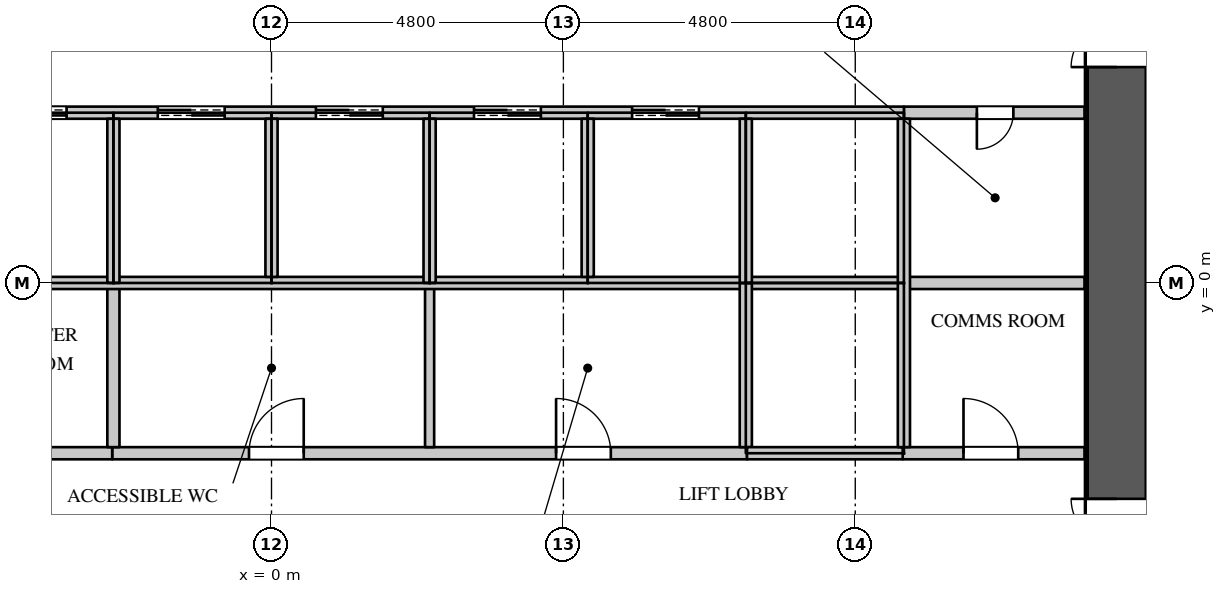
"""IFC4 building model, lengths in metres.
Left out: names, types, materials, properties, quantities, classifications, styles, units other than length and angle.
Written with IfcOpenShell. Run it as: python <this file> out.ifc"""

import sys

from ifc_helpers import new_model, si_unit, direction, frame, frame_2d, origin, place, context, subcontext, project, spatial, rectangle, extrude, element, fill, save


model = new_model("IFC4")
c1 = context("Model", 3, precision=1e-05, world=origin(), true_north=direction((0.0, 1.0)))
c2 = subcontext(c1, "Body", "Model", "MODEL_VIEW")
j1 = project(units=[si_unit("LENGTHUNIT", "METRE"), si_unit("PLANEANGLEUNIT", "RADIAN")], contexts=[c1])
p1 = place(None, origin())
s1 = spatial("IfcSite", under=j1, at=p1, CompositionType="ELEMENT")
p2 = place(p1, origin())
s2 = spatial("IfcBuilding", under=s1, at=p2, CompositionType="ELEMENT")
p3 = place(p2, frame((0.0, 0.0, 92.7)))
s3 = spatial("IfcBuildingStorey", under=s2, at=p3, CompositionType="ELEMENT", Elevation=92.7)
p4 = place(p3, frame((13.9, -11.0, 0.0), z_axis=(0.0, 0.0, 1.0), x_axis=(0.0, 1.0, 0.0)))
e1 = element("IfcWall", 1, at=p4, inside=s3, PredefinedType="SHEAR", context=c2, shape_type="SweptSolid", body=[
    extrude(rectangle(XDim=22.0, YDim=1.0, at=frame_2d((11.0, 0.0))), origin(), (0.0, 0.0, 1.0), 4.2),
])
p5 = place(p4, frame((20.05, 0.0, 0.0)))
e2 = element("IfcOpeningElement", 2, at=p5, cuts=e1, PredefinedType="OPENING", context=c2, shape_type="SweptSolid", body=[
    extrude(rectangle(XDim=1.1, YDim=2.2, at=frame_2d((0.55, 1.1))), frame((0.0, 0.51, 0.0), z_axis=(0.0, -1.0, 0.0), x_axis=(1.0, 0.0, 0.0)), (0.0, 0.0, 1.0), 1.02),
])
p6 = place(p4, frame((0.85, 0.0, 0.0)))
e3 = element("IfcOpeningElement", 3, at=p6, cuts=e1, PredefinedType="OPENING", context=c2, shape_type="SweptSolid", body=[
    extrude(rectangle(XDim=1.1, YDim=2.2, at=frame_2d((0.55, 1.1))), frame((0.0, 0.51, 0.0), z_axis=(0.0, -1.0, 0.0), x_axis=(1.0, 0.0, 0.0)), (0.0, 0.0, 1.0), 1.02),
])
p7 = place(p4, frame((14.55, 0.0, 0.0)))
e4 = element("IfcOpeningElement", 4, at=p7, cuts=e1, PredefinedType="OPENING", context=c2, shape_type="SweptSolid", body=[
    extrude(rectangle(XDim=1.5, YDim=2.4, at=frame_2d((0.75, 1.2))), frame((0.0, 0.51, 0.0), z_axis=(0.0, -1.0, 0.0), x_axis=(1.0, 0.0, 0.0)), (0.0, 0.0, 1.0), 1.02),
])
p8 = place(p4, frame((5.95, 0.0, 0.0)))
e5 = element("IfcOpeningElement", 5, at=p8, cuts=e1, PredefinedType="OPENING", context=c2, shape_type="SweptSolid", body=[
    extrude(rectangle(XDim=1.5, YDim=2.4, at=frame_2d((0.75, 1.2))), frame((0.0, 0.51, 0.0), z_axis=(0.0, -1.0, 0.0), x_axis=(1.0, 0.0, 0.0)), (0.0, 0.0, 1.0), 1.02),
])
p9 = place(p3, frame((-2.62, -2.8, 0.0), z_axis=(0.0, 0.0, 1.0), x_axis=(1.0, 0.0, 0.0)))
e6 = element("IfcWall", 6, at=p9, inside=s3, PredefinedType="PARTITIONING", context=c2, shape_type="SweptSolid", body=[
    extrude(rectangle(XDim=10.44, YDim=0.2, at=frame_2d((5.22, 0.0))), origin(), (0.0, 0.0, 1.0), 3.798),
])
p10 = place(p9, frame((2.25, 0.0, 0.0)))
e7 = element("IfcOpeningElement", 7, at=p10, cuts=e6, PredefinedType="OPENING", context=c2, shape_type="SweptSolid", body=[
    extrude(rectangle(XDim=0.9, YDim=2.2, at=frame_2d((0.45, 1.1))), frame((0.0, 0.11, 0.0), z_axis=(0.0, -1.0, 0.0), x_axis=(1.0, 0.0, 0.0)), (0.0, 0.0, 1.0), 0.22),
])
p11 = place(p9, frame((7.3, 0.0, 0.0)))
e8 = element("IfcOpeningElement", 8, at=p11, cuts=e6, PredefinedType="OPENING", context=c2, shape_type="SweptSolid", body=[
    extrude(rectangle(XDim=0.9, YDim=2.2, at=frame_2d((0.45, 1.1))), frame((0.0, 0.11, 0.0), z_axis=(0.0, -1.0, 0.0), x_axis=(1.0, 0.0, 0.0)), (0.0, 0.0, 1.0), 0.22),
])
p12 = place(p3, frame((2.6, -2.7, 0.0), z_axis=(0.0, 0.0, 1.0), x_axis=(0.0, 1.0, 0.0)))
e9 = element("IfcWall", 9, at=p12, inside=s3, PredefinedType="PARTITIONING", context=c2, shape_type="SweptSolid", body=[
    extrude(rectangle(XDim=2.7, YDim=0.15, at=frame_2d((1.35, 0.0))), origin(), (0.0, 0.0, 1.0), 3.798),
])
p13 = place(p3, frame((-7.82, -2.8, 0.0), z_axis=(0.0, 0.0, 1.0), x_axis=(1.0, 0.0, 0.0)))
e10 = element("IfcWall", 10, at=p13, inside=s3, PredefinedType="PARTITIONING", context=c2, shape_type="SweptSolid", body=[
    extrude(rectangle(XDim=5.2, YDim=0.2, at=frame_2d((2.6, 0.0))), origin(), (0.0, 0.0, 1.0), 3.798),
])
p14 = place(p13, frame((2.15, 0.0, 0.0)))
e11 = element("IfcOpeningElement", 11, at=p14, cuts=e10, PredefinedType="OPENING", context=c2, shape_type="SweptSolid", body=[
    extrude(rectangle(XDim=0.9, YDim=2.2, at=frame_2d((0.45, 1.1))), frame((0.0, 0.11, 0.0), z_axis=(0.0, -1.0, 0.0), x_axis=(1.0, 0.0, 0.0)), (0.0, 0.0, 1.0), 0.22),
])
p15 = place(p3, frame((-2.6, -2.7, 0.0), z_axis=(0.0, 0.0, 1.0), x_axis=(0.0, 1.0, 0.0)))
e12 = element("IfcWall", 12, at=p15, inside=s3, PredefinedType="PARTITIONING", context=c2, shape_type="SweptSolid", body=[
    extrude(rectangle(XDim=2.7, YDim=0.2, at=frame_2d((1.35, 0.0))), origin(), (0.0, 0.0, 1.0), 3.798),
])
p16 = place(p3, frame((10.38, -2.8, 0.0), z_axis=(0.0, 0.0, 1.0), x_axis=(1.0, 0.0, 0.0)))
e13 = element("IfcWall", 13, at=p16, inside=s3, PredefinedType="PARTITIONING", context=c2, shape_type="SweptSolid", body=[
    extrude(rectangle(XDim=2.99, YDim=0.2, at=frame_2d((1.495, 0.0))), origin(), (0.0, 0.0, 1.0), 3.798),
])
p17 = place(p16, frame((1.0, 0.0, 0.0)))
e14 = element("IfcOpeningElement", 14, at=p17, cuts=e13, PredefinedType="OPENING", context=c2, shape_type="SweptSolid", body=[
    extrude(rectangle(XDim=0.9, YDim=2.2, at=frame_2d((0.45, 1.1))), frame((0.0, 0.11, 0.0), z_axis=(0.0, -1.0, 0.0), x_axis=(1.0, 0.0, 0.0)), (0.0, 0.0, 1.0), 0.22),
])
p18 = place(p3, frame((10.4, 2.8, 0.0), z_axis=(0.0, 0.0, 1.0), x_axis=(1.0, 0.0, 0.0)))
e15 = element("IfcWall", 15, at=p18, inside=s3, PredefinedType="PARTITIONING", context=c2, shape_type="SweptSolid", body=[
    extrude(rectangle(XDim=2.97, YDim=0.2, at=frame_2d((1.485, 0.0))), origin(), (0.0, 0.0, 1.0), 3.798),
])
p19 = place(p18, frame((1.2, 0.0, 0.0)))
e16 = element("IfcOpeningElement", 16, at=p19, cuts=e15, PredefinedType="OPENING", context=c2, shape_type="SweptSolid", body=[
    extrude(rectangle(XDim=0.6, YDim=2.0, at=frame_2d((0.3, 1.0))), frame((0.0, 0.11, 0.0), z_axis=(0.0, -1.0, 0.0), x_axis=(1.0, 0.0, 0.0)), (0.0, 0.0, 1.0), 0.22),
])
p20 = place(p3, frame((10.4, 0.0, 0.0), z_axis=(0.0, 0.0, 1.0), x_axis=(1.0, 0.0, 0.0)))
e17 = element("IfcWall", 17, at=p20, inside=s3, PredefinedType="PARTITIONING", context=c2, shape_type="SweptSolid", body=[
    extrude(rectangle(XDim=2.97, YDim=0.2, at=frame_2d((1.485, 0.0))), origin(), (0.0, 0.0, 1.0), 3.798),
])
p21 = place(p3, frame((-13.37, 0.0, 0.0), z_axis=(0.0, 0.0, 1.0), x_axis=(1.0, 0.0, 0.0)))
e18 = element("IfcWall", 18, at=p21, inside=s3, PredefinedType="PARTITIONING", context=c2, shape_type="SweptSolid", body=[
    extrude(rectangle(XDim=23.77, YDim=0.2, at=frame_2d((11.885, 0.0))), origin(), (0.0, 0.0, 1.0), 3.798),
])
p22 = place(p3, frame((-13.37, 2.8, 0.0), z_axis=(0.0, 0.0, 1.0), x_axis=(1.0, 0.0, 0.0)))
e19 = element("IfcWall", 19, at=p22, inside=s3, PredefinedType="PARTITIONING", context=c2, shape_type="SweptSolid", body=[
    extrude(rectangle(XDim=23.77, YDim=0.2, at=frame_2d((11.885, 0.0))), origin(), (0.0, 0.0, 1.0), 3.798),
])
p23 = place(p22, frame((0.9, 0.0, 0.0)))
e20 = element("IfcOpeningElement", 20, at=p23, cuts=e19, PredefinedType="OPENING", context=c2, shape_type="SweptSolid", body=[
    extrude(rectangle(XDim=1.1, YDim=2.2, at=frame_2d((0.55, 1.1))), frame((0.0, 0.11, 0.0), z_axis=(0.0, -1.0, 0.0), x_axis=(1.0, 0.0, 0.0)), (0.0, 0.0, 1.0), 0.22),
])
p24 = place(p22, frame((3.7, 0.0, 0.0)))
e21 = element("IfcOpeningElement", 21, at=p24, cuts=e19, PredefinedType="OPENING", context=c2, shape_type="SweptSolid", body=[
    extrude(rectangle(XDim=1.1, YDim=2.2, at=frame_2d((0.55, 1.1))), frame((0.0, 0.11, 0.0), z_axis=(0.0, -1.0, 0.0), x_axis=(1.0, 0.0, 0.0)), (0.0, 0.0, 1.0), 0.22),
])
p25 = place(p22, frame((6.3, 0.0, 0.0)))
e22 = element("IfcOpeningElement", 22, at=p25, cuts=e19, PredefinedType="OPENING", context=c2, shape_type="SweptSolid", body=[
    extrude(rectangle(XDim=1.1, YDim=2.2, at=frame_2d((0.55, 1.1))), frame((0.0, 0.11, 0.0), z_axis=(0.0, -1.0, 0.0), x_axis=(1.0, 0.0, 0.0)), (0.0, 0.0, 1.0), 0.22),
])
p26 = place(p22, frame((8.9, 0.0, 0.0)))
e23 = element("IfcOpeningElement", 23, at=p26, cuts=e19, PredefinedType="OPENING", context=c2, shape_type="SweptSolid", body=[
    extrude(rectangle(XDim=1.1, YDim=2.2, at=frame_2d((0.55, 1.1))), frame((0.0, 0.11, 0.0), z_axis=(0.0, -1.0, 0.0), x_axis=(1.0, 0.0, 0.0)), (0.0, 0.0, 1.0), 0.22),
])
p27 = place(p22, frame((11.5, 0.0, 0.0)))
e24 = element("IfcOpeningElement", 24, at=p27, cuts=e19, PredefinedType="OPENING", context=c2, shape_type="SweptSolid", body=[
    extrude(rectangle(XDim=1.1, YDim=2.2, at=frame_2d((0.55, 1.1))), frame((0.0, 0.11, 0.0), z_axis=(0.0, -1.0, 0.0), x_axis=(1.0, 0.0, 0.0)), (0.0, 0.0, 1.0), 0.22),
])
p28 = place(p22, frame((14.1, 0.0, 0.0)))
e25 = element("IfcOpeningElement", 25, at=p28, cuts=e19, PredefinedType="OPENING", context=c2, shape_type="SweptSolid", body=[
    extrude(rectangle(XDim=1.1, YDim=2.2, at=frame_2d((0.55, 1.1))), frame((0.0, 0.11, 0.0), z_axis=(0.0, -1.0, 0.0), x_axis=(1.0, 0.0, 0.0)), (0.0, 0.0, 1.0), 0.22),
])
p29 = place(p22, frame((16.7, 0.0, 0.0)))
e26 = element("IfcOpeningElement", 26, at=p29, cuts=e19, PredefinedType="OPENING", context=c2, shape_type="SweptSolid", body=[
    extrude(rectangle(XDim=1.1, YDim=2.2, at=frame_2d((0.55, 1.1))), frame((0.0, 0.11, 0.0), z_axis=(0.0, -1.0, 0.0), x_axis=(1.0, 0.0, 0.0)), (0.0, 0.0, 1.0), 0.22),
])
p30 = place(p22, frame((19.3, 0.0, 0.0)))
e27 = element("IfcOpeningElement", 27, at=p30, cuts=e19, PredefinedType="OPENING", context=c2, shape_type="SweptSolid", body=[
    extrude(rectangle(XDim=1.1, YDim=2.2, at=frame_2d((0.55, 1.1))), frame((0.0, 0.11, 0.0), z_axis=(0.0, -1.0, 0.0), x_axis=(1.0, 0.0, 0.0)), (0.0, 0.0, 1.0), 0.22),
])
p31 = place(p3, frame((-2.6, 0.0, 0.0), z_axis=(0.0, 0.0, 1.0), x_axis=(0.0, 1.0, 0.0)))
e28 = element("IfcWall", 28, at=p31, inside=s3, PredefinedType="PARTITIONING", context=c2, shape_type="SweptSolid", body=[
    extrude(rectangle(XDim=2.7, YDim=0.2, at=frame_2d((1.35, 0.0))), origin(), (0.0, 0.0, 1.0), 3.798),
])
p32 = place(p3, frame((0.0, 0.1, 0.0), z_axis=(0.0, 0.0, 1.0), x_axis=(0.0, 1.0, 0.0)))
e29 = element("IfcWall", 29, at=p32, inside=s3, PredefinedType="PARTITIONING", context=c2, shape_type="SweptSolid", body=[
    extrude(rectangle(XDim=2.6, YDim=0.2, at=frame_2d((1.3, 0.0))), origin(), (0.0, 0.0, 1.0), 3.798),
])
p33 = place(p3, frame((2.6, 0.0, 0.0), z_axis=(0.0, 0.0, 1.0), x_axis=(0.0, 1.0, 0.0)))
e30 = element("IfcWall", 30, at=p33, inside=s3, PredefinedType="PARTITIONING", context=c2, shape_type="SweptSolid", body=[
    extrude(rectangle(XDim=2.7, YDim=0.2, at=frame_2d((1.35, 0.0))), origin(), (0.0, 0.0, 1.0), 3.798),
])
p34 = place(p3, frame((5.2, 0.1, 0.0), z_axis=(0.0, 0.0, 1.0), x_axis=(0.0, 1.0, 0.0)))
e31 = element("IfcWall", 31, at=p34, inside=s3, PredefinedType="PARTITIONING", context=c2, shape_type="SweptSolid", body=[
    extrude(rectangle(XDim=2.6, YDim=0.2, at=frame_2d((1.3, 0.0))), origin(), (0.0, 0.0, 1.0), 3.798),
])
p35 = place(p3, frame((7.8, -2.7, 0.0), z_axis=(0.0, 0.0, 1.0), x_axis=(0.0, 1.0, 0.0)))
e32 = element("IfcWall", 32, at=p35, inside=s3, PredefinedType="PARTITIONING", context=c2, shape_type="SweptSolid", body=[
    extrude(rectangle(XDim=2.7, YDim=0.2, at=frame_2d((1.35, 0.0))), origin(), (0.0, 0.0, 1.0), 3.798),
])
p36 = place(p3, frame((7.82, -2.8, 0.0), z_axis=(0.0, 0.0, 1.0), x_axis=(1.0, 0.0, 0.0)))
e33 = element("IfcWall", 33, at=p36, inside=s3, PredefinedType="PARTITIONING", context=c2, shape_type="SweptSolid", body=[
    extrude(rectangle(XDim=2.56, YDim=0.2, at=frame_2d((1.28, 0.0))), origin(), (0.0, 0.0, 1.0), 3.798),
])
p37 = place(p3, frame((7.8, 0.0, 0.0), z_axis=(0.0, 0.0, 1.0), x_axis=(0.0, 1.0, 0.0)))
e34 = element("IfcWall", 34, at=p37, inside=s3, PredefinedType="PARTITIONING", context=c2, shape_type="SweptSolid", body=[
    extrude(rectangle(XDim=2.7, YDim=0.2, at=frame_2d((1.35, 0.0))), origin(), (0.0, 0.0, 1.0), 3.798),
])
p38 = place(p3, frame((10.4, -2.7, 0.0), z_axis=(0.0, 0.0, 1.0), x_axis=(0.0, 1.0, 0.0)))
e35 = element("IfcWall", 35, at=p38, inside=s3, PredefinedType="PARTITIONING", context=c2, shape_type="SweptSolid", body=[
    extrude(rectangle(XDim=5.4, YDim=0.2, at=frame_2d((2.7, 0.0))), origin(), (0.0, 0.0, 1.0), 3.798),
])
p39 = place(p19, origin())
e36 = element("IfcDoor", 36, at=p39, inside=s3, OperationType="SINGLE_SWING_RIGHT", PredefinedType="DOOR", context=c2, shape_type="SweptSolid", body=[
    extrude(rectangle(XDim=0.6, YDim=2.0, at=frame_2d((0.3, 1.0))), frame((0.0, 0.025, 0.0), z_axis=(0.0, -1.0, 0.0), x_axis=(1.0, 0.0, 0.0)), (0.0, 0.0, 1.0), 0.05),
])
fill(e16, e36)
p40 = place(p17, origin())
e37 = element("IfcDoor", 37, at=p40, inside=s3, OperationType="SINGLE_SWING_LEFT", PredefinedType="DOOR", context=c2, shape_type="SweptSolid", body=[
    extrude(rectangle(XDim=0.9, YDim=2.2, at=frame_2d((0.45, 1.1))), frame((0.0, 0.025, 0.0), z_axis=(0.0, -1.0, 0.0), x_axis=(1.0, 0.0, 0.0)), (0.0, 0.0, 1.0), 0.05),
])
fill(e14, e37)
p41 = place(p10, origin())
e38 = element("IfcDoor", 38, at=p41, inside=s3, OperationType="SINGLE_SWING_RIGHT", PredefinedType="DOOR", context=c2, shape_type="SweptSolid", body=[
    extrude(rectangle(XDim=0.9, YDim=2.2, at=frame_2d((0.45, 1.1))), frame((0.0, 0.025, 0.0), z_axis=(0.0, -1.0, 0.0), x_axis=(1.0, 0.0, 0.0)), (0.0, 0.0, 1.0), 0.05),
])
fill(e7, e38)
p42 = place(p11, origin())
e39 = element("IfcDoor", 39, at=p42, inside=s3, OperationType="SINGLE_SWING_LEFT", PredefinedType="DOOR", context=c2, shape_type="SweptSolid", body=[
    extrude(rectangle(XDim=0.9, YDim=2.2, at=frame_2d((0.45, 1.1))), frame((0.0, 0.025, 0.0), z_axis=(0.0, -1.0, 0.0), x_axis=(1.0, 0.0, 0.0)), (0.0, 0.0, 1.0), 0.05),
])
fill(e8, e39)
p43 = place(p26, origin())
e40 = element("IfcDoor", 40, at=p43, inside=s3, OperationType="DOUBLE_DOOR_SLIDING", PredefinedType="DOOR", context=c2, shape_type="SweptSolid", body=[
    extrude(rectangle(XDim=1.1, YDim=2.2, at=frame_2d((0.55, 1.1))), frame((0.0, 0.025, 0.0), z_axis=(0.0, -1.0, 0.0), x_axis=(1.0, 0.0, 0.0)), (0.0, 0.0, 1.0), 0.05),
])
fill(e23, e40)
p44 = place(p27, origin())
e41 = element("IfcDoor", 41, at=p44, inside=s3, OperationType="DOUBLE_DOOR_SLIDING", PredefinedType="DOOR", context=c2, shape_type="SweptSolid", body=[
    extrude(rectangle(XDim=1.1, YDim=2.2, at=frame_2d((0.55, 1.1))), frame((0.0, 0.025, 0.0), z_axis=(0.0, -1.0, 0.0), x_axis=(1.0, 0.0, 0.0)), (0.0, 0.0, 1.0), 0.05),
])
fill(e24, e41)
p45 = place(p28, origin())
e42 = element("IfcDoor", 42, at=p45, inside=s3, OperationType="DOUBLE_DOOR_SLIDING", PredefinedType="DOOR", context=c2, shape_type="SweptSolid", body=[
    extrude(rectangle(XDim=1.1, YDim=2.2, at=frame_2d((0.55, 1.1))), frame((0.0, 0.025, 0.0), z_axis=(0.0, -1.0, 0.0), x_axis=(1.0, 0.0, 0.0)), (0.0, 0.0, 1.0), 0.05),
])
fill(e25, e42)
p46 = place(p29, origin())
e43 = element("IfcDoor", 43, at=p46, inside=s3, OperationType="DOUBLE_DOOR_SLIDING", PredefinedType="DOOR", context=c2, shape_type="SweptSolid", body=[
    extrude(rectangle(XDim=1.1, YDim=2.2, at=frame_2d((0.55, 1.1))), frame((0.0, 0.025, 0.0), z_axis=(0.0, -1.0, 0.0), x_axis=(1.0, 0.0, 0.0)), (0.0, 0.0, 1.0), 0.05),
])
fill(e26, e43)
p47 = place(p30, origin())
e44 = element("IfcDoor", 44, at=p47, inside=s3, OperationType="DOUBLE_DOOR_SLIDING", PredefinedType="DOOR", context=c2, shape_type="SweptSolid", body=[
    extrude(rectangle(XDim=1.1, YDim=2.2, at=frame_2d((0.55, 1.1))), frame((0.0, 0.025, 0.0), z_axis=(0.0, -1.0, 0.0), x_axis=(1.0, 0.0, 0.0)), (0.0, 0.0, 1.0), 0.05),
])
fill(e27, e44)
p48 = place(p7, origin())
e45 = element("IfcDoor", 45, at=p48, inside=s3, OperationType="DOUBLE_DOOR_SINGLE_SWING", PredefinedType="DOOR", context=c2, shape_type="SweptSolid", body=[
    extrude(rectangle(XDim=1.5, YDim=2.4, at=frame_2d((0.75, 1.2))), frame((0.0, 0.495, 0.0), z_axis=(0.0, -1.0, 0.0), x_axis=(1.0, 0.0, 0.0)), (0.0, 0.0, 1.0), 0.05),
])
fill(e4, e45)
p49 = place(p8, origin())
e46 = element("IfcDoor", 46, at=p49, inside=s3, OperationType="DOUBLE_DOOR_SINGLE_SWING", PredefinedType="DOOR", context=c2, shape_type="SweptSolid", body=[
    extrude(rectangle(XDim=1.5, YDim=2.4, at=frame_2d((0.75, 1.2))), frame((0.0, 0.495, 0.0), z_axis=(0.0, -1.0, 0.0), x_axis=(1.0, 0.0, 0.0)), (0.0, 0.0, 1.0), 0.05),
])
fill(e5, e46)
save(model, sys.argv[1])
